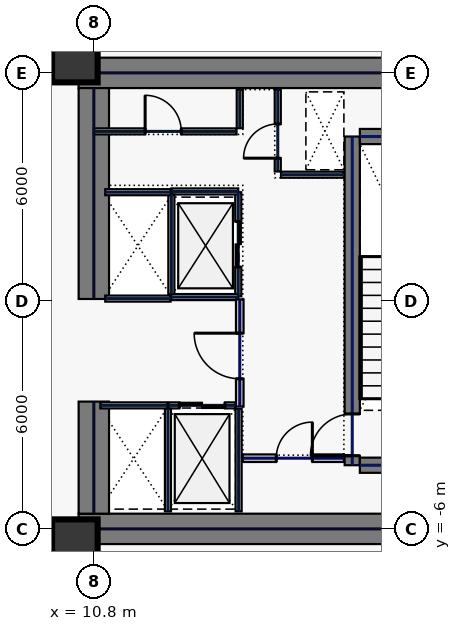
"""IFC4 building model, lengths in metres.
Left out: names, types, materials, properties, quantities, classifications, styles, units other than length and angle.
Written with IfcOpenShell. Run it as: python <this file> out.ifc"""

import sys

from ifc_helpers import new_model, si_unit, direction, frame, frame_2d, origin, origin_2d, place, context, subcontext, project, spatial, rectangle, hollow_rectangle, extrude, element, fill, save


model = new_model("IFC4")
c1 = context("Model", 3, precision=1e-05, world=origin(), true_north=direction((0.0, 1.0)))
c2 = subcontext(c1, "Body", "Model", "MODEL_VIEW")
j1 = project(units=[si_unit("LENGTHUNIT", "METRE"), si_unit("PLANEANGLEUNIT", "RADIAN")], contexts=[c1])
p1 = place(None, origin())
s1 = spatial("IfcSite", under=j1, at=p1, CompositionType="ELEMENT")
p2 = place(p1, origin())
s2 = spatial("IfcBuilding", under=s1, at=p2, CompositionType="ELEMENT")
p3 = place(p2, frame((0.0, 0.0, 63.4)))
s3 = spatial("IfcBuildingStorey", under=s2, at=p3, CompositionType="ELEMENT", Elevation=63.4)
for number, where, z_axis, x_axis in (
    (1, (10.4, 6.0, 0.0), (0.0, 0.0, 1.0), (1.0, 0.0, 0.0)),
    (2, (10.4, -6.0, 0.0), (0.0, 0.0, 1.0), (1.0, 0.0, 0.0)),
):
    element("IfcWall", number, at=place(p3, frame(where, z_axis=z_axis, x_axis=x_axis)), inside=s3, PredefinedType="SHEAR", context=c2, shape_type="SweptSolid", body=[
        extrude(rectangle(XDim=11.6, YDim=0.8, at=frame_2d((5.8, 0.0))), origin(), (0.0, 0.0, 1.0), 3.74),
    ])
p4 = place(p3, frame((10.8, -5.6, 0.0), z_axis=(0.0, 0.0, 1.0), x_axis=(0.0, 1.0, 0.0)))
e3 = element("IfcWall", 3, at=p4, inside=s3, PredefinedType="SHEAR", context=c2, shape_type="SweptSolid", body=[
    extrude(rectangle(XDim=2.95, YDim=0.8, at=frame_2d((1.475, 0.0))), origin(), (0.0, 0.0, 1.0), 3.74),
])
p5 = place(p3, frame((10.8, 0.05, 0.0), z_axis=(0.0, 0.0, 1.0), x_axis=(0.0, 1.0, 0.0)))
e4 = element("IfcWall", 4, at=p5, inside=s3, PredefinedType="SHEAR", context=c2, shape_type="SweptSolid", body=[
    extrude(rectangle(XDim=5.55, YDim=0.8, at=frame_2d((2.775, 0.0))), origin(), (0.0, 0.0, 1.0), 3.74),
])
p6 = place(p3, frame((17.6, -4.325, 0.0), z_axis=(0.0, 0.0, 1.0), x_axis=(0.0, 1.0, 0.0)))
e5 = element("IfcWall", 5, at=p6, inside=s3, PredefinedType="SHEAR", context=c2, shape_type="SweptSolid", body=[
    extrude(rectangle(XDim=8.65, YDim=0.4, at=frame_2d((4.325, 0.0))), origin(), (0.0, 0.0, 1.0), 3.74),
])
p7 = place(p6, frame((0.25, 0.0, 0.0)))
e6 = element("IfcOpeningElement", 6, at=p7, cuts=e5, PredefinedType="OPENING", context=c2, shape_type="SweptSolid", body=[
    extrude(rectangle(XDim=1.1, YDim=2.2, at=frame_2d((0.55, 1.1))), frame((0.0, 0.21, 0.0), z_axis=(0.0, -1.0, 0.0), x_axis=(1.0, 0.0, 0.0)), (0.0, 0.0, 1.0), 0.42),
])
for number, where, z_axis, x_axis in (
    (7, (17.8, -4.325, 0.0), (0.0, 0.0, 1.0), (1.0, 0.0, 0.0)),
    (8, (17.8, 4.325, 0.0), (0.0, 0.0, 1.0), (1.0, 0.0, 0.0)),
):
    element("IfcWall", number, at=place(p3, frame(where, z_axis=z_axis, x_axis=x_axis)), inside=s3, PredefinedType="SHEAR", context=c2, shape_type="SweptSolid", body=[
        extrude(rectangle(XDim=3.4, YDim=0.4, at=frame_2d((1.7, 0.0))), origin(), (0.0, 0.0, 1.0), 3.74),
    ])
for number, where, z_axis, x_axis in (
    (9, (10.3, -6.35, 0.0), (0.0, 0.0, 1.0), (1.0, 0.0, 0.0)),
    (10, (10.3, 6.35, 0.0), (0.0, 0.0, 1.0), (1.0, 0.0, 0.0)),
):
    element("IfcColumn", number, at=place(p3, frame(where, z_axis=z_axis, x_axis=x_axis)), inside=s3, PredefinedType="COLUMN", context=c2, shape_type="SweptSolid", body=[
        extrude(hollow_rectangle(XDim=1.2, YDim=1.2, WallThickness=0.05, at=origin_2d()), origin(), (0.0, 0.0, 1.0), 3.74),
    ])
p8 = place(p3, frame((14.6, 0.12, 0.0), z_axis=(0.0, 0.0, 1.0), x_axis=(0.0, 1.0, 0.0)))
e11 = element("IfcWall", 11, at=p8, inside=s3, PredefinedType="PARTITIONING", context=c2, shape_type="SweptSolid", body=[
    extrude(rectangle(XDim=2.74, YDim=0.16, at=frame_2d((1.37, 0.0))), origin(), (0.0, 0.0, 1.0), 3.74),
])
p9 = place(p8, frame((0.77, 0.0, 0.0)))
e12 = element("IfcOpeningElement", 12, at=p9, cuts=e11, PredefinedType="OPENING", context=c2, shape_type="SweptSolid", body=[
    extrude(rectangle(XDim=1.2, YDim=2.2, at=frame_2d((0.6, 1.1))), frame((0.0, 0.09, 0.0), z_axis=(0.0, -1.0, 0.0), x_axis=(1.0, 0.0, 0.0)), (0.0, 0.0, 1.0), 0.18),
])
for number, where, z_axis, x_axis in (
    (13, (12.84, 0.1, 0.0), (0.0, 0.0, 1.0), (1.0, 0.0, 0.0)),
    (14, (12.84, 2.88, 0.0), (0.0, 0.0, 1.0), (1.0, 0.0, 0.0)),
):
    element("IfcWall", number, at=place(p3, frame(where, z_axis=z_axis, x_axis=x_axis)), inside=s3, PredefinedType="PARTITIONING", context=c2, shape_type="SweptSolid", body=[
        extrude(rectangle(XDim=1.76, YDim=0.16, at=frame_2d((0.88, 0.0))), origin(), (0.0, 0.0, 1.0), 3.74),
    ])
p10 = place(p3, frame((12.84, 0.18, 0.0), z_axis=(0.0, 0.0, 1.0), x_axis=(0.0, 1.0, 0.0)))
e15 = element("IfcWall", 15, at=p10, inside=s3, PredefinedType="PARTITIONING", context=c2, shape_type="SweptSolid", body=[
    extrude(rectangle(XDim=2.62, YDim=0.16, at=frame_2d((1.31, 0.0))), origin(), (0.0, 0.0, 1.0), 3.74),
])
p11 = place(p3, frame((12.77, -2.75, 0.0), z_axis=(0.0, 0.0, 1.0), x_axis=(1.0, 0.0, 0.0)))
e16 = element("IfcWall", 16, at=p11, inside=s3, PredefinedType="PARTITIONING", context=c2, shape_type="SweptSolid", body=[
    extrude(rectangle(XDim=1.76, YDim=0.16, at=frame_2d((0.88, 0.0))), origin(), (0.0, 0.0, 1.0), 3.74),
])
p12 = place(p11, frame((0.28, 0.0, 0.0)))
e17 = element("IfcOpeningElement", 17, at=p12, cuts=e16, PredefinedType="OPENING", context=c2, shape_type="SweptSolid", body=[
    extrude(rectangle(XDim=1.2, YDim=2.2, at=frame_2d((0.6, 1.1))), frame((0.0, 0.09, 0.0), z_axis=(0.0, -1.0, 0.0), x_axis=(1.0, 0.0, 0.0)), (0.0, 0.0, 1.0), 0.18),
])
for number, where, z_axis, x_axis in (
    (18, (12.75, -5.54, 0.0), (0.0, 0.0, 1.0), (0.0, 1.0, 0.0)),
    (19, (14.61, -5.54, 0.0), (0.0, 0.0, 1.0), (0.0, 1.0, 0.0)),
):
    element("IfcWall", number, at=place(p3, frame(where, z_axis=z_axis, x_axis=x_axis)), inside=s3, PredefinedType="PARTITIONING", context=c2, shape_type="SweptSolid", body=[
        extrude(rectangle(XDim=2.7, YDim=0.16, at=frame_2d((1.35, 0.0))), origin(), (0.0, 0.0, 1.0), 3.74),
    ])
p13 = place(p3, frame((10.97, -2.75, 0.0), z_axis=(0.0, 0.0, 1.0), x_axis=(1.0, 0.0, 0.0)))
e20 = element("IfcWall", 20, at=p13, inside=s3, PredefinedType="PARTITIONING", context=c2, shape_type="SweptSolid", body=[
    extrude(rectangle(XDim=1.76, YDim=0.16, at=frame_2d((0.88, 0.0))), origin(), (0.0, 0.0, 1.0), 3.74),
])
for number, where, z_axis, x_axis in (
    (21, (11.1, 0.06, 0.0), (0.0, 0.0, 1.0), (1.0, 0.0, 0.0)),
    (22, (11.1, 2.86, 0.0), (0.0, 0.0, 1.0), (1.0, 0.0, 0.0)),
):
    element("IfcWall", number, at=place(p3, frame(where, z_axis=z_axis, x_axis=x_axis)), inside=s3, PredefinedType="PARTITIONING", context=c2, shape_type="SweptSolid", body=[
        extrude(rectangle(XDim=1.72, YDim=0.16, at=frame_2d((0.86, 0.0))), origin(), (0.0, 0.0, 1.0), 3.74),
    ])
p14 = place(p3, frame((15.64, 3.405, 0.0), z_axis=(0.0, 0.0, 1.0), x_axis=(0.0, 1.0, 0.0)))
e23 = element("IfcWall", 23, at=p14, inside=s3, PredefinedType="PARTITIONING", context=c2, shape_type="SweptSolid", body=[
    extrude(rectangle(XDim=2.155, YDim=0.16, at=frame_2d((1.078, 0.0))), origin(), (0.0, 0.0, 1.0), 3.74),
])
p15 = place(p14, frame((0.35, 0.0, 0.0)))
e24 = element("IfcOpeningElement", 24, at=p15, cuts=e23, PredefinedType="OPENING", context=c2, shape_type="SweptSolid", body=[
    extrude(rectangle(XDim=0.9, YDim=2.2, at=frame_2d((0.45, 1.1))), frame((0.0, 0.09, 0.0), z_axis=(0.0, -1.0, 0.0), x_axis=(1.0, 0.0, 0.0)), (0.0, 0.0, 1.0), 0.18),
])
p16 = place(p3, frame((15.725, 3.32, 0.0), z_axis=(0.0, 0.0, 1.0), x_axis=(1.0, 0.0, 0.0)))
e25 = element("IfcWall", 25, at=p16, inside=s3, PredefinedType="PARTITIONING", context=c2, shape_type="SweptSolid", body=[
    extrude(rectangle(XDim=1.655, YDim=0.16, at=frame_2d((0.827, 0.0))), origin(), (0.0, 0.0, 1.0), 3.74),
])
p17 = place(p3, frame((14.72, -4.14, 0.0), z_axis=(0.0, 0.0, 1.0), x_axis=(1.0, 0.0, 0.0)))
e26 = element("IfcWall", 26, at=p17, inside=s3, PredefinedType="SOLIDWALL", context=c2, shape_type="SweptSolid", body=[
    extrude(rectangle(XDim=2.66, YDim=0.2, at=frame_2d((1.33, 0.0))), origin(), (0.0, 0.0, 1.0), 3.74),
])
p18 = place(p17, frame((0.88, 0.0, 0.0)))
e27 = element("IfcOpeningElement", 27, at=p18, cuts=e26, PredefinedType="OPENING", context=c2, shape_type="SweptSolid", body=[
    extrude(rectangle(XDim=0.95, YDim=2.2, at=frame_2d((0.475, 1.1))), frame((0.0, 0.11, 0.0), z_axis=(0.0, -1.0, 0.0), x_axis=(1.0, 0.0, 0.0)), (0.0, 0.0, 1.0), 0.22),
])
p19 = place(p3, frame((10.8, 4.46, 0.0), z_axis=(0.0, 0.0, 1.0), x_axis=(1.0, 0.0, 0.0)))
e28 = element("IfcWall", 28, at=p19, inside=s3, PredefinedType="PARTITIONING", context=c2, shape_type="SweptSolid", body=[
    extrude(rectangle(XDim=3.755, YDim=0.16, at=frame_2d((1.877, 0.0))), origin(), (0.0, 0.0, 1.0), 3.74),
])
p20 = place(p19, frame((1.35, 0.0, 0.0)))
e29 = element("IfcOpeningElement", 29, at=p20, cuts=e28, PredefinedType="OPENING", context=c2, shape_type="SweptSolid", body=[
    extrude(rectangle(XDim=0.95, YDim=2.2, at=frame_2d((0.475, 1.1))), frame((0.0, 0.09, 0.0), z_axis=(0.0, -1.0, 0.0), x_axis=(1.0, 0.0, 0.0)), (0.0, 0.0, 1.0), 0.18),
])
p21 = place(p3, frame((14.64, 4.545, 0.0), z_axis=(0.0, 0.0, 1.0), x_axis=(0.0, 1.0, 0.0)))
e30 = element("IfcWall", 30, at=p21, inside=s3, PredefinedType="PARTITIONING", context=c2, shape_type="SweptSolid", body=[
    extrude(rectangle(XDim=1.015, YDim=0.16, at=frame_2d((0.508, 0.0))), origin(), (0.0, 0.0, 1.0), 3.74),
])
p22 = place(p3, frame((14.64, -2.78, 0.0), z_axis=(0.0, 0.0, 1.0), x_axis=(0.0, 1.0, 0.0)))
e31 = element("IfcWall", 31, at=p22, inside=s3, PredefinedType="SOLIDWALL", context=c2, shape_type="SweptSolid", body=[
    extrude(rectangle(XDim=2.82, YDim=0.2, at=frame_2d((1.41, 0.0))), origin(), (0.0, 0.0, 1.0), 3.74),
])
p23 = place(p22, frame((0.73, 0.0, 0.0)))
e32 = element("IfcOpeningElement", 32, at=p23, cuts=e31, PredefinedType="OPENING", context=c2, shape_type="SweptSolid", body=[
    extrude(rectangle(XDim=1.2, YDim=2.2, at=frame_2d((0.6, 1.1))), frame((0.0, 0.11, 0.0), z_axis=(0.0, -1.0, 0.0), x_axis=(1.0, 0.0, 0.0)), (0.0, 0.0, 1.0), 0.22),
])
p24 = place(p3, frame((10.58, 7.885, 0.0), z_axis=(0.0, 0.0, 1.0), x_axis=(0.0, -1.0, 0.0)))
e33 = element("IfcWall", 33, at=p24, inside=s3, PredefinedType="PARTITIONING", context=c2, shape_type="SweptSolid", body=[
    extrude(rectangle(XDim=1.465, YDim=0.16, at=frame_2d((0.732, 0.0))), origin(), (0.0, 0.0, 1.0), 1.535),
])
p25 = place(p3, frame((10.58, -6.42, 0.0), z_axis=(0.0, 0.0, 1.0), x_axis=(0.0, -1.0, 0.0)))
e34 = element("IfcWall", 34, at=p25, inside=s3, PredefinedType="PARTITIONING", context=c2, shape_type="SweptSolid", body=[
    extrude(rectangle(XDim=1.365, YDim=0.16, at=frame_2d((0.683, 0.0))), origin(), (0.0, 0.0, 1.0), 3.74),
])
p26 = place(p7, origin())
e35 = element("IfcDoor", 35, at=p26, inside=s3, OperationType="SINGLE_SWING_LEFT", PredefinedType="DOOR", context=c2, shape_type="SweptSolid", body=[
    extrude(rectangle(XDim=1.1, YDim=2.2, at=frame_2d((0.55, 1.1))), frame((0.0, 0.025, 0.0), z_axis=(0.0, -1.0, 0.0), x_axis=(1.0, 0.0, 0.0)), (0.0, 0.0, 1.0), 0.05),
])
fill(e6, e35)
p27 = place(p9, origin())
e36 = element("IfcDoor", 36, at=p27, inside=s3, OperationType="SLIDING_TO_LEFT", PredefinedType="DOOR", context=c2, shape_type="SweptSolid", body=[
    extrude(rectangle(XDim=1.2, YDim=2.2, at=frame_2d((0.6, 1.1))), frame((0.0, 0.025, 0.0), z_axis=(0.0, -1.0, 0.0), x_axis=(1.0, 0.0, 0.0)), (0.0, 0.0, 1.0), 0.05),
])
fill(e12, e36)
p28 = place(p12, origin())
e37 = element("IfcDoor", 37, at=p28, inside=s3, OperationType="SLIDING_TO_LEFT", PredefinedType="DOOR", context=c2, shape_type="SweptSolid", body=[
    extrude(rectangle(XDim=1.2, YDim=2.2, at=frame_2d((0.6, 1.1))), frame((0.0, 0.025, 0.0), z_axis=(0.0, -1.0, 0.0), x_axis=(1.0, 0.0, 0.0)), (0.0, 0.0, 1.0), 0.05),
])
fill(e17, e37)
p29 = place(p15, origin())
e38 = element("IfcDoor", 38, at=p29, inside=s3, OperationType="SINGLE_SWING_LEFT", PredefinedType="DOOR", context=c2, shape_type="SweptSolid", body=[
    extrude(rectangle(XDim=0.9, YDim=2.2, at=frame_2d((0.45, 1.1))), frame((0.0, 0.025, 0.0), z_axis=(0.0, -1.0, 0.0), x_axis=(1.0, 0.0, 0.0)), (0.0, 0.0, 1.0), 0.05),
])
fill(e24, e38)
p30 = place(p18, origin())
e39 = element("IfcDoor", 39, at=p30, inside=s3, OperationType="SINGLE_SWING_RIGHT", PredefinedType="DOOR", context=c2, shape_type="SweptSolid", body=[
    extrude(rectangle(XDim=0.95, YDim=2.2, at=frame_2d((0.475, 1.1))), frame((0.0, 0.025, 0.0), z_axis=(0.0, -1.0, 0.0), x_axis=(1.0, 0.0, 0.0)), (0.0, 0.0, 1.0), 0.05),
])
fill(e27, e39)
p31 = place(p20, origin())
e40 = element("IfcDoor", 40, at=p31, inside=s3, OperationType="SINGLE_SWING_LEFT", PredefinedType="DOOR", context=c2, shape_type="SweptSolid", body=[
    extrude(rectangle(XDim=0.95, YDim=2.2, at=frame_2d((0.475, 1.1))), frame((0.0, 0.025, 0.0), z_axis=(0.0, -1.0, 0.0), x_axis=(1.0, 0.0, 0.0)), (0.0, 0.0, 1.0), 0.05),
])
fill(e29, e40)
p32 = place(p23, origin())
e41 = element("IfcDoor", 41, at=p32, inside=s3, OperationType="SINGLE_SWING_RIGHT", PredefinedType="DOOR", context=c2, shape_type="SweptSolid", body=[
    extrude(rectangle(XDim=1.2, YDim=2.2, at=frame_2d((0.6, 1.1))), frame((0.0, 0.025, 0.0), z_axis=(0.0, -1.0, 0.0), x_axis=(1.0, 0.0, 0.0)), (0.0, 0.0, 1.0), 0.05),
])
fill(e32, e41)
save(model, sys.argv[1])
